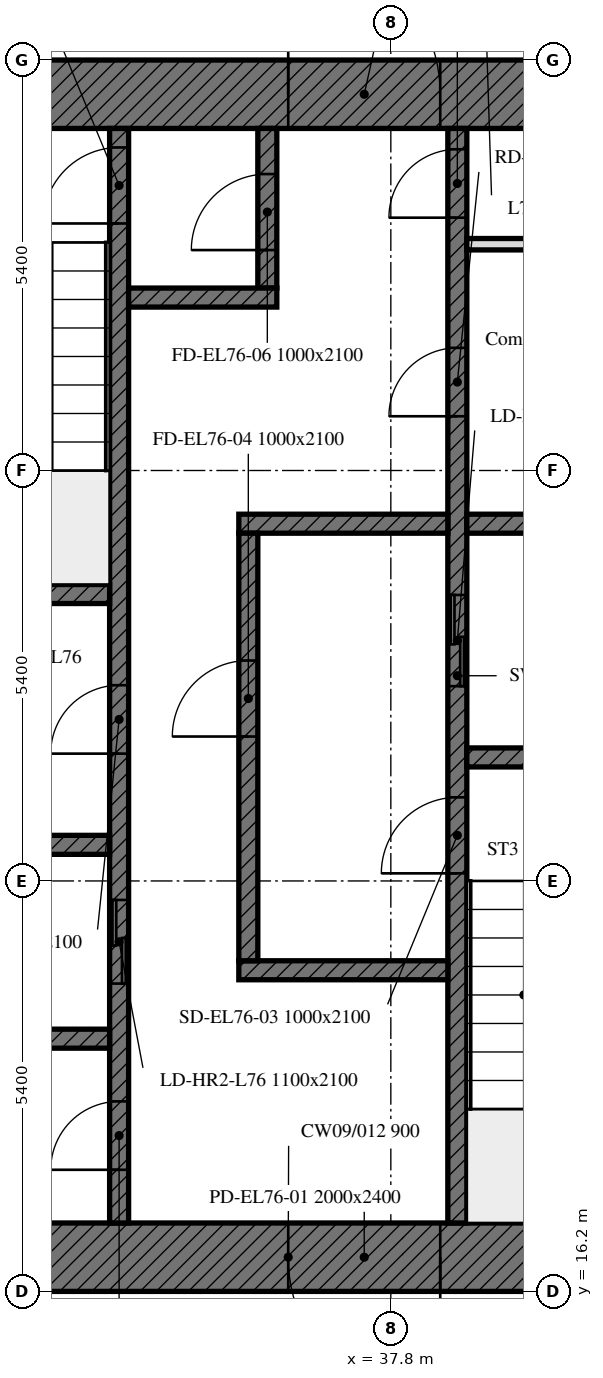
"""IFC4 building model, lengths in metres.
Left out: names, types, materials, properties, quantities, classifications, styles, units other than length and angle.
Written with IfcOpenShell. Run it as: python <this file> out.ifc"""

import sys

from ifc_helpers import new_model, si_unit, direction, frame, frame_2d, origin, place, context, subcontext, project, spatial, rectangle, extrude, element, fill, save


model = new_model("IFC4")
c1 = context("Model", 3, precision=1e-05, world=origin(), true_north=direction((0.0, 1.0)))
c2 = subcontext(c1, "Body", "Model", "MODEL_VIEW")
j1 = project(units=[si_unit("LENGTHUNIT", "METRE"), si_unit("PLANEANGLEUNIT", "RADIAN")], contexts=[c1])
p1 = place(None, origin())
s1 = spatial("IfcSite", under=j1, at=p1, CompositionType="ELEMENT")
p2 = place(p1, origin())
s2 = spatial("IfcBuilding", under=s1, at=p2, CompositionType="ELEMENT")
p3 = place(p2, frame((0.0, 0.0, 304.9)))
s3 = spatial("IfcBuildingStorey", under=s2, at=p3, CompositionType="ELEMENT", Elevation=304.9)
p4 = place(p3, frame((42.0, 16.65, 0.0), z_axis=(0.0, 0.0, 1.0), x_axis=(-1.0, 0.0, 0.0)))
e1 = element("IfcWall", 1, at=p4, inside=s3, PredefinedType="SOLIDWALL", context=c2, shape_type="SweptSolid", body=[
    extrude(rectangle(XDim=11.1, YDim=0.9, at=frame_2d((5.55, 0.0))), origin(), (0.0, 0.0, 1.0), 2.8),
])
p5 = place(p4, frame((3.55, 0.0, 0.0)))
e2 = element("IfcOpeningElement", 2, at=p5, cuts=e1, PredefinedType="OPENING", context=c2, shape_type="SweptSolid", body=[
    extrude(rectangle(XDim=2.0, YDim=2.4, at=frame_2d((1.0, 1.2))), frame((0.0, 0.45, 0.0), z_axis=(0.0, -1.0, 0.0), x_axis=(1.0, 0.0, 0.0)), (0.0, 0.0, 1.0), 0.9),
])
p6 = place(p3, frame((30.9, 31.95, 0.0), z_axis=(0.0, 0.0, 1.0), x_axis=(1.0, 0.0, 0.0)))
e3 = element("IfcWall", 3, at=p6, inside=s3, PredefinedType="SOLIDWALL", context=c2, shape_type="SweptSolid", body=[
    extrude(rectangle(XDim=11.1, YDim=0.9, at=frame_2d((5.55, 0.0))), origin(), (0.0, 0.0, 1.0), 2.8),
])
p7 = place(p6, frame((5.55, 0.0, 0.0)))
e4 = element("IfcOpeningElement", 4, at=p7, cuts=e3, PredefinedType="OPENING", context=c2, shape_type="SweptSolid", body=[
    extrude(rectangle(XDim=2.0, YDim=2.4, at=frame_2d((1.0, 1.2))), frame((0.0, 0.45, 0.0), z_axis=(0.0, -1.0, 0.0), x_axis=(1.0, 0.0, 0.0)), (0.0, 0.0, 1.0), 0.9),
])
p8 = place(p3, frame((38.675, 17.1, 0.0), z_axis=(0.0, 0.0, 1.0), x_axis=(0.0, 1.0, 0.0)))
e5 = element("IfcWall", 5, at=p8, inside=s3, PredefinedType="SOLIDWALL", context=c2, shape_type="SweptSolid", body=[
    extrude(rectangle(XDim=14.4, YDim=0.25, at=frame_2d((7.2, 0.0))), origin(), (0.0, 0.0, 1.0), 2.8),
])
p9 = place(p8, frame((4.6, 0.0, 0.0)))
e6 = element("IfcOpeningElement", 6, at=p9, cuts=e5, PredefinedType="OPENING", context=c2, shape_type="SweptSolid", body=[
    extrude(rectangle(XDim=1.0, YDim=2.1, at=frame_2d((0.5, 1.05))), frame((0.0, 0.125, 0.0), z_axis=(0.0, -1.0, 0.0), x_axis=(1.0, 0.0, 0.0)), (0.0, 0.0, 1.0), 0.25),
])
p10 = place(p8, frame((7.062, 0.0, 0.0)))
e7 = element("IfcOpeningElement", 7, at=p10, cuts=e5, PredefinedType="OPENING", context=c2, shape_type="SweptSolid", body=[
    extrude(rectangle(XDim=1.2, YDim=2.1, at=frame_2d((0.6, 1.05))), frame((0.0, 0.125, 0.0), z_axis=(0.0, -1.0, 0.0), x_axis=(1.0, 0.0, 0.0)), (0.0, 0.0, 1.0), 0.25),
])
p11 = place(p8, frame((10.614, 0.0, 0.0)))
e8 = element("IfcOpeningElement", 8, at=p11, cuts=e5, PredefinedType="OPENING", context=c2, shape_type="SweptSolid", body=[
    extrude(rectangle(XDim=0.9, YDim=2.1, at=frame_2d((0.45, 1.05))), frame((0.0, 0.125, 0.0), z_axis=(0.0, -1.0, 0.0), x_axis=(1.0, 0.0, 0.0)), (0.0, 0.0, 1.0), 0.25),
])
p12 = place(p8, frame((13.226, 0.0, 0.0)))
e9 = element("IfcOpeningElement", 9, at=p12, cuts=e5, PredefinedType="OPENING", context=c2, shape_type="SweptSolid", body=[
    extrude(rectangle(XDim=0.9, YDim=2.1, at=frame_2d((0.45, 1.05))), frame((0.0, 0.125, 0.0), z_axis=(0.0, -1.0, 0.0), x_axis=(1.0, 0.0, 0.0)), (0.0, 0.0, 1.0), 0.25),
])
p13 = place(p3, frame((34.225, 17.1, 0.0), z_axis=(0.0, 0.0, 1.0), x_axis=(0.0, 1.0, 0.0)))
e10 = element("IfcWall", 10, at=p13, inside=s3, PredefinedType="SOLIDWALL", context=c2, shape_type="SweptSolid", body=[
    extrude(rectangle(XDim=14.4, YDim=0.25, at=frame_2d((7.2, 0.0))), origin(), (0.0, 0.0, 1.0), 2.8),
])
p14 = place(p13, frame((13.15, 0.0, 0.0)))
e11 = element("IfcOpeningElement", 11, at=p14, cuts=e10, PredefinedType="OPENING", context=c2, shape_type="SweptSolid", body=[
    extrude(rectangle(XDim=1.0, YDim=2.1, at=frame_2d((0.5, 1.05))), frame((0.0, 0.125, 0.0), z_axis=(0.0, -1.0, 0.0), x_axis=(1.0, 0.0, 0.0)), (0.0, 0.0, 1.0), 0.25),
])
p15 = place(p13, frame((3.15, 0.0, 0.0)))
e12 = element("IfcOpeningElement", 12, at=p15, cuts=e10, PredefinedType="OPENING", context=c2, shape_type="SweptSolid", body=[
    extrude(rectangle(XDim=1.1, YDim=2.1, at=frame_2d((0.55, 1.05))), frame((0.0, 0.125, 0.0), z_axis=(0.0, -1.0, 0.0), x_axis=(1.0, 0.0, 0.0)), (0.0, 0.0, 1.0), 0.25),
])
p16 = place(p13, frame((0.7, 0.0, 0.0)))
e13 = element("IfcOpeningElement", 13, at=p16, cuts=e10, PredefinedType="OPENING", context=c2, shape_type="SweptSolid", body=[
    extrude(rectangle(XDim=0.9, YDim=2.1, at=frame_2d((0.45, 1.05))), frame((0.0, 0.125, 0.0), z_axis=(0.0, -1.0, 0.0), x_axis=(1.0, 0.0, 0.0)), (0.0, 0.0, 1.0), 0.25),
])
p17 = place(p13, frame((6.175, 0.0, 0.0)))
e14 = element("IfcOpeningElement", 14, at=p17, cuts=e10, PredefinedType="OPENING", context=c2, shape_type="SweptSolid", body=[
    extrude(rectangle(XDim=0.9, YDim=2.1, at=frame_2d((0.45, 1.05))), frame((0.0, 0.125, 0.0), z_axis=(0.0, -1.0, 0.0), x_axis=(1.0, 0.0, 0.0)), (0.0, 0.0, 1.0), 0.25),
])
p18 = place(p3, frame((38.8, 23.225, 0.0), z_axis=(0.0, 0.0, 1.0), x_axis=(1.0, 0.0, 0.0)))
e15 = element("IfcWall", 15, at=p18, inside=s3, PredefinedType="SOLIDWALL", context=c2, shape_type="SweptSolid", body=[
    extrude(rectangle(XDim=3.2, YDim=0.25, at=frame_2d((1.6, 0.0))), origin(), (0.0, 0.0, 1.0), 2.8),
])
for number, where, z_axis, x_axis in (
    (16, (30.9, 25.375, 0.0), (0.0, 0.0, 1.0), (1.0, 0.0, 0.0)),
    (17, (30.9, 22.075, 0.0), (0.0, 0.0, 1.0), (1.0, 0.0, 0.0)),
):
    element("IfcWall", number, at=place(p3, frame(where, z_axis=z_axis, x_axis=x_axis)), inside=s3, PredefinedType="SOLIDWALL", context=c2, shape_type="SweptSolid", body=[
        extrude(rectangle(XDim=3.2, YDim=0.25, at=frame_2d((1.6, 0.0))), origin(), (0.0, 0.0, 1.0), 2.8),
    ])
p19 = place(p3, frame((38.8, 26.3, 0.0), z_axis=(0.0, 0.0, 1.0), x_axis=(1.0, 0.0, 0.0)))
e18 = element("IfcWall", 18, at=p19, inside=s3, PredefinedType="SOLIDWALL", context=c2, shape_type="SweptSolid", body=[
    extrude(rectangle(XDim=3.2, YDim=0.25, at=frame_2d((1.6, 0.0))), origin(), (0.0, 0.0, 1.0), 2.8),
])
for number, where, z_axis, x_axis in (
    (19, (35.8, 26.3, 0.0), (0.0, 0.0, 1.0), (1.0, 0.0, 0.0)),
    (20, (35.8, 20.425, 0.0), (0.0, 0.0, 1.0), (1.0, 0.0, 0.0)),
):
    element("IfcWall", number, at=place(p3, frame(where, z_axis=z_axis, x_axis=x_axis)), inside=s3, PredefinedType="SOLIDWALL", context=c2, shape_type="SweptSolid", body=[
        extrude(rectangle(XDim=2.75, YDim=0.25, at=frame_2d((1.375, 0.0))), origin(), (0.0, 0.0, 1.0), 2.8),
    ])
p20 = place(p3, frame((36.175, 29.4, 0.0), z_axis=(0.0, 0.0, 1.0), x_axis=(0.0, 1.0, 0.0)))
e21 = element("IfcWall", 21, at=p20, inside=s3, PredefinedType="SOLIDWALL", context=c2, shape_type="SweptSolid", body=[
    extrude(rectangle(XDim=2.1, YDim=0.25, at=frame_2d((1.05, 0.0))), origin(), (0.0, 0.0, 1.0), 2.8),
])
p21 = place(p20, frame((0.5, 0.0, 0.0)))
e22 = element("IfcOpeningElement", 22, at=p21, cuts=e21, PredefinedType="OPENING", context=c2, shape_type="SweptSolid", body=[
    extrude(rectangle(XDim=1.0, YDim=2.1, at=frame_2d((0.5, 1.05))), frame((0.0, 0.125, 0.0), z_axis=(0.0, -1.0, 0.0), x_axis=(1.0, 0.0, 0.0)), (0.0, 0.0, 1.0), 0.25),
])
p22 = place(p3, frame((34.35, 29.275, 0.0), z_axis=(0.0, 0.0, 1.0), x_axis=(1.0, 0.0, 0.0)))
e23 = element("IfcWall", 23, at=p22, inside=s3, PredefinedType="SOLIDWALL", context=c2, shape_type="SweptSolid", body=[
    extrude(rectangle(XDim=1.95, YDim=0.25, at=frame_2d((0.975, 0.0))), origin(), (0.0, 0.0, 1.0), 2.8),
])
p23 = place(p3, frame((35.925, 20.55, 0.0), z_axis=(0.0, 0.0, 1.0), x_axis=(0.0, 1.0, 0.0)))
e24 = element("IfcWall", 24, at=p23, inside=s3, PredefinedType="SOLIDWALL", context=c2, shape_type="SweptSolid", body=[
    extrude(rectangle(XDim=5.625, YDim=0.25, at=frame_2d((2.812, 0.0))), origin(), (0.0, 0.0, 1.0), 2.8),
])
p24 = place(p23, frame((2.95, 0.0, 0.0)))
e25 = element("IfcOpeningElement", 25, at=p24, cuts=e24, PredefinedType="OPENING", context=c2, shape_type="SweptSolid", body=[
    extrude(rectangle(XDim=1.0, YDim=2.1, at=frame_2d((0.5, 1.05))), frame((0.0, 0.125, 0.0), z_axis=(0.0, -1.0, 0.0), x_axis=(1.0, 0.0, 0.0)), (0.0, 0.0, 1.0), 0.25),
])
p25 = place(p3, frame((30.9, 19.525, 0.0), z_axis=(0.0, 0.0, 1.0), x_axis=(1.0, 0.0, 0.0)))
e26 = element("IfcWall", 26, at=p25, inside=s3, PredefinedType="SOLIDWALL", context=c2, shape_type="SweptSolid", body=[
    extrude(rectangle(XDim=3.2, YDim=0.25, at=frame_2d((1.6, 0.0))), origin(), (0.0, 0.0, 1.0), 2.8),
])
p26 = place(p3, frame((38.8, 29.977, 0.0), z_axis=(0.0, 0.0, 1.0), x_axis=(1.0, 0.0, 0.0)))
e27 = element("IfcWall", 27, at=p26, inside=s3, PredefinedType="PARTITIONING", context=c2, shape_type="SweptSolid", body=[
    extrude(rectangle(XDim=3.2, YDim=0.15, at=frame_2d((1.6, 0.0))), origin(), (0.0, 0.0, 1.0), 2.8),
])
p27 = place(p5, origin())
e28 = element("IfcDoor", 28, at=p27, inside=s3, OperationType="DOUBLE_DOOR_SINGLE_SWING", PredefinedType="DOOR", context=c2, shape_type="SweptSolid", body=[
    extrude(rectangle(XDim=2.0, YDim=2.4, at=frame_2d((1.0, 1.2))), frame((0.0, 0.025, 0.0), z_axis=(0.0, -1.0, 0.0), x_axis=(1.0, 0.0, 0.0)), (0.0, 0.0, 1.0), 0.05),
])
fill(e2, e28)
p28 = place(p7, origin())
e29 = element("IfcDoor", 29, at=p28, inside=s3, OperationType="DOUBLE_DOOR_SINGLE_SWING", PredefinedType="DOOR", context=c2, shape_type="SweptSolid", body=[
    extrude(rectangle(XDim=2.0, YDim=2.4, at=frame_2d((1.0, 1.2))), frame((0.0, 0.025, 0.0), z_axis=(0.0, -1.0, 0.0), x_axis=(1.0, 0.0, 0.0)), (0.0, 0.0, 1.0), 0.05),
])
fill(e4, e29)
p29 = place(p9, origin())
e30 = element("IfcDoor", 30, at=p29, inside=s3, OperationType="SINGLE_SWING_LEFT", PredefinedType="DOOR", context=c2, shape_type="SweptSolid", body=[
    extrude(rectangle(XDim=1.0, YDim=2.1, at=frame_2d((0.5, 1.05))), frame((0.0, 0.025, 0.0), z_axis=(0.0, -1.0, 0.0), x_axis=(1.0, 0.0, 0.0)), (0.0, 0.0, 1.0), 0.05),
])
fill(e6, e30)
p30 = place(p24, origin())
e31 = element("IfcDoor", 31, at=p30, inside=s3, OperationType="SINGLE_SWING_LEFT", PredefinedType="DOOR", context=c2, shape_type="SweptSolid", body=[
    extrude(rectangle(XDim=1.0, YDim=2.1, at=frame_2d((0.5, 1.05))), frame((0.0, 0.025, 0.0), z_axis=(0.0, -1.0, 0.0), x_axis=(1.0, 0.0, 0.0)), (0.0, 0.0, 1.0), 0.05),
])
fill(e25, e31)
p31 = place(p14, origin())
e32 = element("IfcDoor", 32, at=p31, inside=s3, OperationType="SINGLE_SWING_LEFT", PredefinedType="DOOR", context=c2, shape_type="SweptSolid", body=[
    extrude(rectangle(XDim=1.0, YDim=2.1, at=frame_2d((0.5, 1.05))), frame((0.0, 0.025, 0.0), z_axis=(0.0, -1.0, 0.0), x_axis=(1.0, 0.0, 0.0)), (0.0, 0.0, 1.0), 0.05),
])
fill(e11, e32)
p32 = place(p21, origin())
e33 = element("IfcDoor", 33, at=p32, inside=s3, OperationType="SINGLE_SWING_LEFT", PredefinedType="DOOR", context=c2, shape_type="SweptSolid", body=[
    extrude(rectangle(XDim=1.0, YDim=2.1, at=frame_2d((0.5, 1.05))), frame((0.0, 0.025, 0.0), z_axis=(0.0, -1.0, 0.0), x_axis=(1.0, 0.0, 0.0)), (0.0, 0.0, 1.0), 0.05),
])
fill(e22, e33)
p33 = place(p10, origin())
e34 = element("IfcDoor", 34, at=p33, inside=s3, OperationType="DOUBLE_DOOR_SLIDING", PredefinedType="DOOR", context=c2, shape_type="SweptSolid", body=[
    extrude(rectangle(XDim=1.2, YDim=2.1, at=frame_2d((0.6, 1.05))), frame((0.0, 0.025, 0.0), z_axis=(0.0, -1.0, 0.0), x_axis=(1.0, 0.0, 0.0)), (0.0, 0.0, 1.0), 0.05),
])
fill(e7, e34)
p34 = place(p15, origin())
e35 = element("IfcDoor", 35, at=p34, inside=s3, OperationType="DOUBLE_DOOR_SLIDING", PredefinedType="DOOR", context=c2, shape_type="SweptSolid", body=[
    extrude(rectangle(XDim=1.1, YDim=2.1, at=frame_2d((0.55, 1.05))), frame((0.0, 0.025, 0.0), z_axis=(0.0, -1.0, 0.0), x_axis=(1.0, 0.0, 0.0)), (0.0, 0.0, 1.0), 0.05),
])
fill(e12, e35)
p35 = place(p11, origin())
e36 = element("IfcDoor", 36, at=p35, inside=s3, OperationType="SINGLE_SWING_LEFT", PredefinedType="DOOR", context=c2, shape_type="SweptSolid", body=[
    extrude(rectangle(XDim=0.9, YDim=2.1, at=frame_2d((0.45, 1.05))), frame((0.0, 0.025, 0.0), z_axis=(0.0, -1.0, 0.0), x_axis=(1.0, 0.0, 0.0)), (0.0, 0.0, 1.0), 0.05),
])
fill(e8, e36)
p36 = place(p12, origin())
e37 = element("IfcDoor", 37, at=p36, inside=s3, OperationType="SINGLE_SWING_LEFT", PredefinedType="DOOR", context=c2, shape_type="SweptSolid", body=[
    extrude(rectangle(XDim=0.9, YDim=2.1, at=frame_2d((0.45, 1.05))), frame((0.0, 0.025, 0.0), z_axis=(0.0, -1.0, 0.0), x_axis=(1.0, 0.0, 0.0)), (0.0, 0.0, 1.0), 0.05),
])
fill(e9, e37)
p37 = place(p16, origin())
e38 = element("IfcDoor", 38, at=p37, inside=s3, OperationType="SINGLE_SWING_LEFT", PredefinedType="DOOR", context=c2, shape_type="SweptSolid", body=[
    extrude(rectangle(XDim=0.9, YDim=2.1, at=frame_2d((0.45, 1.05))), frame((0.0, 0.025, 0.0), z_axis=(0.0, -1.0, 0.0), x_axis=(1.0, 0.0, 0.0)), (0.0, 0.0, 1.0), 0.05),
])
fill(e13, e38)
p38 = place(p17, origin())
e39 = element("IfcDoor", 39, at=p38, inside=s3, OperationType="SINGLE_SWING_LEFT", PredefinedType="DOOR", context=c2, shape_type="SweptSolid", body=[
    extrude(rectangle(XDim=0.9, YDim=2.1, at=frame_2d((0.45, 1.05))), frame((0.0, 0.025, 0.0), z_axis=(0.0, -1.0, 0.0), x_axis=(1.0, 0.0, 0.0)), (0.0, 0.0, 1.0), 0.05),
])
fill(e14, e39)
save(model, sys.argv[1])
